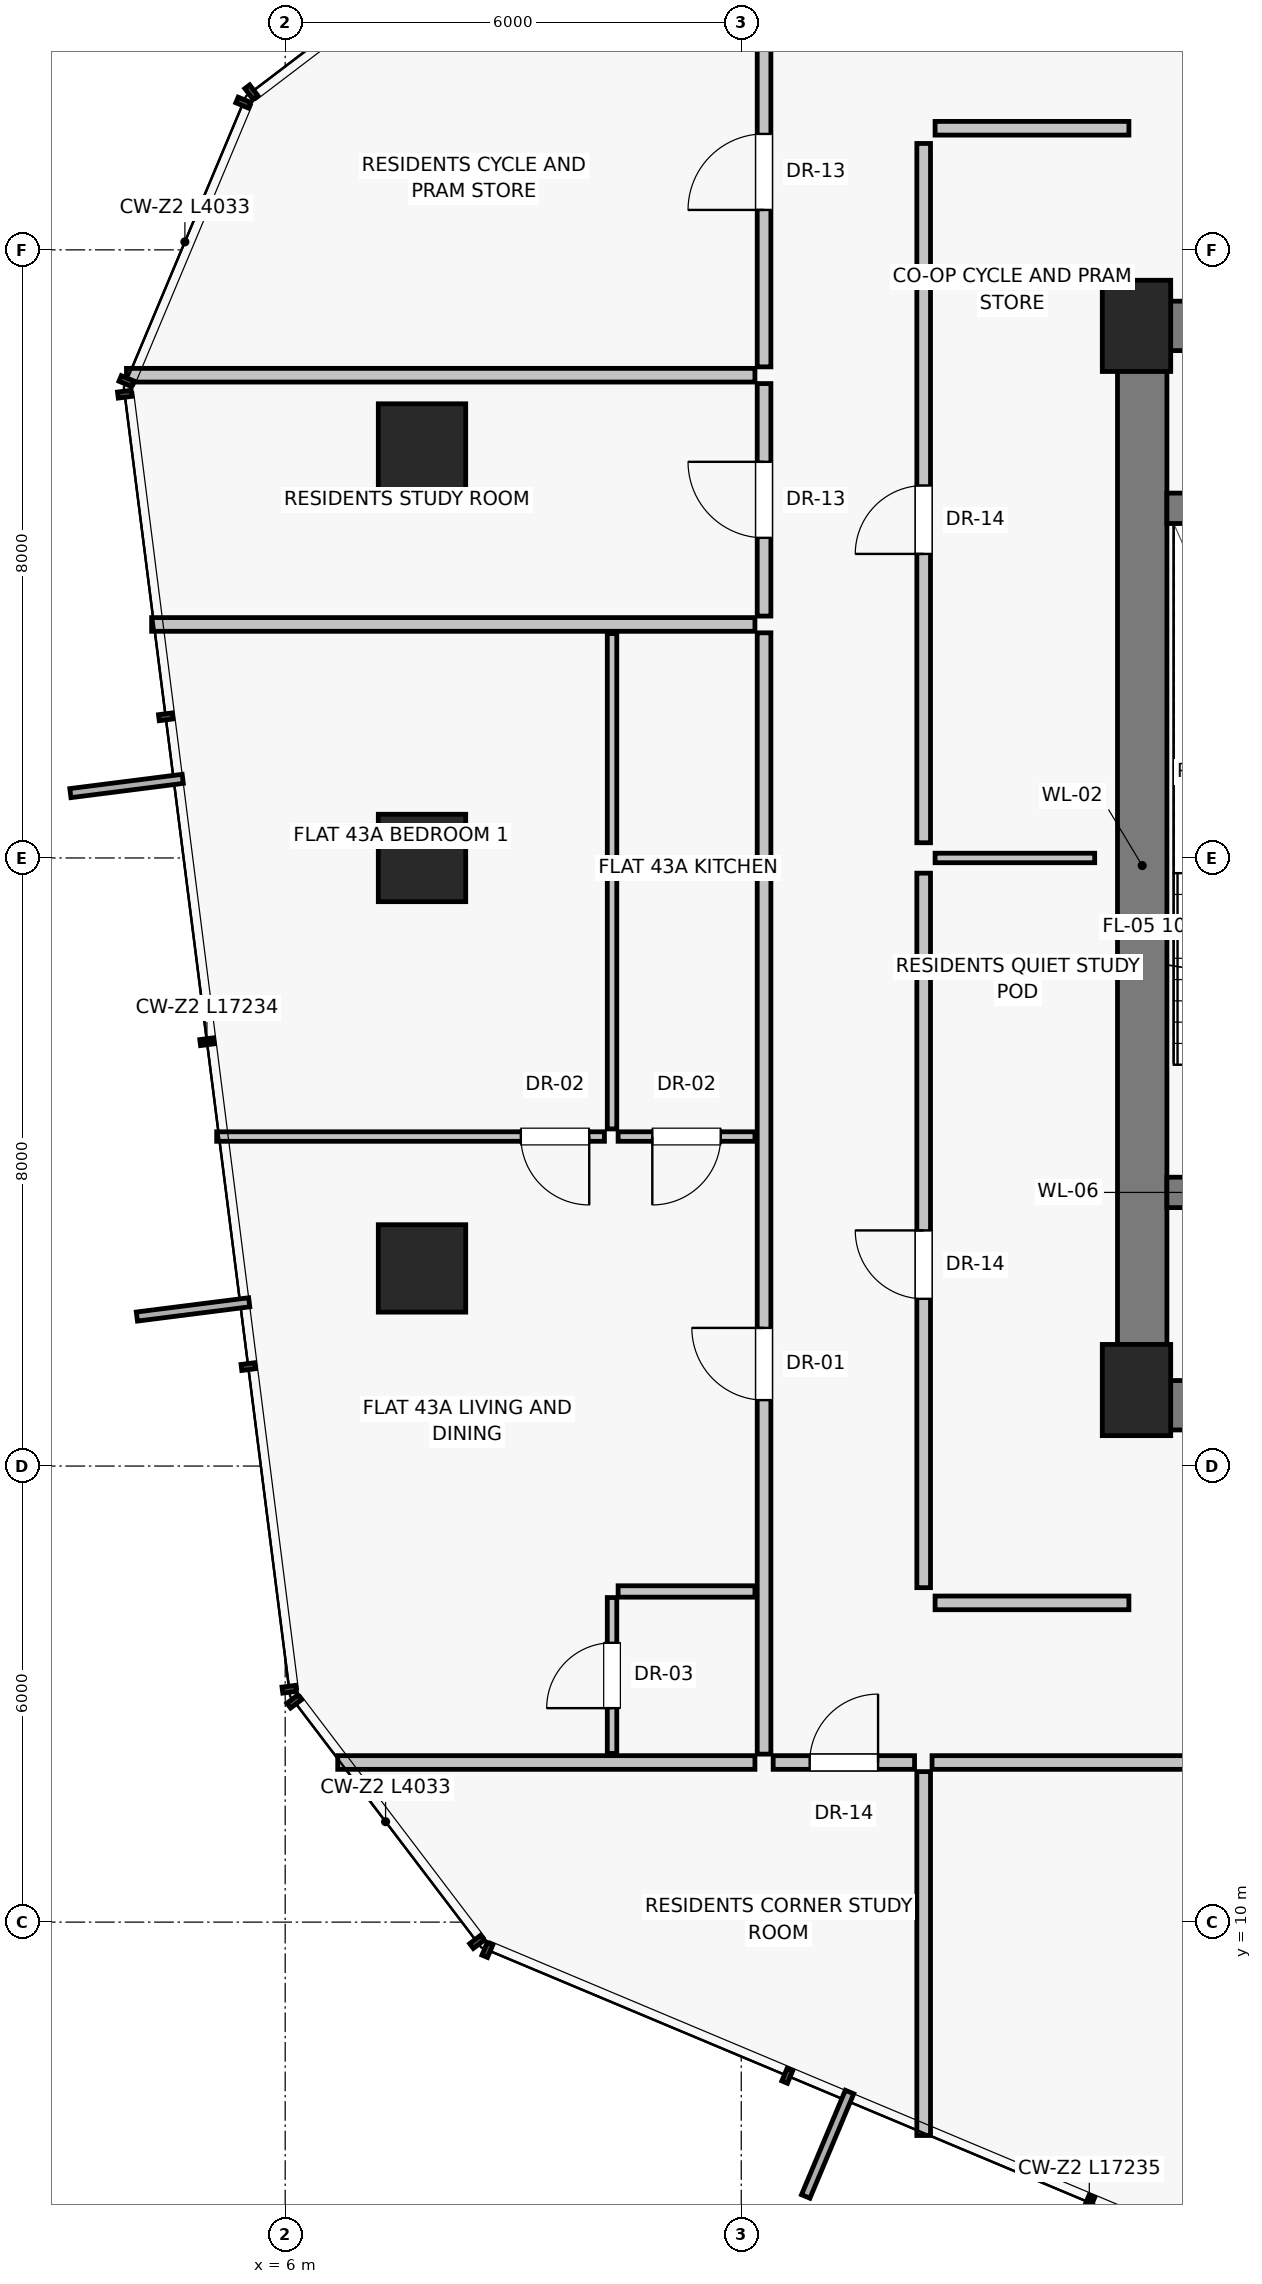
"""IFC4 building model, lengths in metres.
Left out: names, types, materials, properties, quantities, classifications, styles, units other than length and angle.
Written with IfcOpenShell. Run it as: python <this file> out.ifc"""

import sys

from ifc_helpers import new_model, si_unit, direction, frame, frame_2d, origin, origin_2d, place, context, subcontext, project, spatial, rectangle, extrude, source, transform, mapped, element, fill, save


model = new_model("IFC4")
c1 = context("Model", 3, precision=1e-05, world=origin(), true_north=direction((0.0, 1.0)))
c2 = subcontext(c1, "Body", "Model", "MODEL_VIEW")
j1 = project(units=[si_unit("LENGTHUNIT", "METRE"), si_unit("PLANEANGLEUNIT", "RADIAN")], contexts=[c1])
p1 = place(None, origin())
s1 = spatial("IfcSite", under=j1, at=p1, CompositionType="ELEMENT")
p2 = place(p1, origin())
s2 = spatial("IfcBuilding", under=s1, at=p2, CompositionType="ELEMENT")
p3 = place(p2, frame((0.0, 0.0, 152.25)))
s3 = spatial("IfcBuildingStorey", under=s2, at=p3, CompositionType="ELEMENT", Elevation=152.25)
for number, where, z_axis, x_axis in (
    (1, (17.2, 17.0, 0.0), (0.0, 0.0, 1.0), (1.0, 0.0, 0.0)),
    (2, (17.2, 31.0, 0.0), (0.0, 0.0, 1.0), (1.0, 0.0, 0.0)),
):
    element("IfcColumn", number, at=place(p3, frame(where, z_axis=z_axis, x_axis=x_axis)), inside=s3, PredefinedType="PILASTER", context=c2, shape_type="SweptSolid", body=[
        extrude(rectangle(XDim=0.9, YDim=1.2, at=origin_2d()), origin(), (0.0, 0.0, 1.0), 3.25),
    ])
for number, where, z_axis, x_axis in (
    (3, (7.8, 29.4, 0.0), (0.0, 0.0, 1.0), (1.0, 0.0, 0.0)),
    (4, (7.8, 24.0, 0.0), (0.0, 0.0, 1.0), (1.0, 0.0, 0.0)),
    (5, (7.8, 18.6, 0.0), (0.0, 0.0, 1.0), (1.0, 0.0, 0.0)),
):
    element("IfcColumn", number, at=place(p3, frame(where, z_axis=z_axis, x_axis=x_axis)), inside=s3, PredefinedType="COLUMN", context=c2, shape_type="SweptSolid", body=[
        extrude(rectangle(XDim=1.15, YDim=1.15, at=origin_2d()), origin(), (0.0, 0.0, 1.0), 3.25),
    ])
p4 = place(p3, frame((17.275, 16.8, 0.0), z_axis=(0.0, 0.0, 1.0), x_axis=(0.0, 1.0, 0.0)))
e6 = element("IfcWall", 6, at=p4, inside=s3, PredefinedType="SHEAR", context=c2, shape_type="SweptSolid", body=[
    extrude(rectangle(XDim=14.2, YDim=0.65, at=frame_2d((7.1, 0.0))), origin(), (0.0, 0.0, 1.0), 3.0),
])
p5 = place(p3, frame((17.2, 16.8, 0.0), z_axis=(0.0, 0.0, 1.0), x_axis=(1.0, 0.0, 0.0)))
e7 = element("IfcWall", 7, at=p5, inside=s3, PredefinedType="SHEAR", context=c2, shape_type="SweptSolid", body=[
    extrude(rectangle(XDim=5.85, YDim=0.65, at=frame_2d((2.925, 0.0))), origin(), (0.0, 0.0, 1.0), 3.0),
])
p6 = place(p5, frame((1.15, 0.0, 0.0)))
e8 = element("IfcOpeningElement", 8, at=p6, cuts=e7, PredefinedType="OPENING", context=c2, shape_type="SweptSolid", body=[
    extrude(rectangle(XDim=1.2, YDim=2.03, at=frame_2d((0.6, 1.015))), frame((0.0, 0.335, 0.0), z_axis=(0.0, -1.0, 0.0), x_axis=(1.0, 0.0, 0.0)), (0.0, 0.0, 1.0), 0.67),
])
p7 = place(p3, frame((17.2, 31.0, 0.0), z_axis=(0.0, 0.0, 1.0), x_axis=(1.0, 0.0, 0.0)))
e9 = element("IfcWall", 9, at=p7, inside=s3, PredefinedType="SHEAR", context=c2, shape_type="SweptSolid", body=[
    extrude(rectangle(XDim=3.8, YDim=0.65, at=frame_2d((1.9, 0.0))), origin(), (0.0, 0.0, 1.0), 3.0),
])
p8 = place(p7, frame((1.25, 0.0, 0.0)))
e10 = element("IfcOpeningElement", 10, at=p8, cuts=e9, PredefinedType="OPENING", context=c2, shape_type="SweptSolid", body=[
    extrude(rectangle(XDim=0.86, YDim=2.01, at=frame_2d((0.43, 1.005))), frame((0.0, 0.335, 0.0), z_axis=(0.0, -1.0, 0.0), x_axis=(1.0, 0.0, 0.0)), (0.0, 0.0, 1.0), 0.67),
])
p9 = place(p3, frame((17.6, 19.6, 0.0), z_axis=(0.0, 0.0, 1.0), x_axis=(1.0, 0.0, 0.0)))
e11 = element("IfcWall", 11, at=p9, inside=s3, PredefinedType="SHEAR", context=c2, shape_type="SweptSolid", body=[
    extrude(rectangle(XDim=3.4, YDim=0.4, at=frame_2d((1.7, 0.0))), origin(), (0.0, 0.0, 1.0), 3.0),
])
p10 = place(p9, frame((1.05, 0.0, 0.0)))
e12 = element("IfcOpeningElement", 12, at=p10, cuts=e11, PredefinedType="OPENING", context=c2, shape_type="SweptSolid", body=[
    extrude(rectangle(XDim=1.1, YDim=2.03, at=frame_2d((0.55, 1.015))), frame((0.0, 0.21, 0.0), z_axis=(0.0, -1.0, 0.0), x_axis=(1.0, 0.0, 0.0)), (0.0, 0.0, 1.0), 0.42),
])
p11 = place(p3, frame((17.6, 28.6, 0.0), z_axis=(0.0, 0.0, 1.0), x_axis=(1.0, 0.0, 0.0)))
e13 = element("IfcWall", 13, at=p11, inside=s3, PredefinedType="SHEAR", context=c2, shape_type="SweptSolid", body=[
    extrude(rectangle(XDim=3.4, YDim=0.4, at=frame_2d((1.7, 0.0))), origin(), (0.0, 0.0, 1.0), 3.0),
])
p12 = place(p3, frame((14.4, 14.4, 0.0), z_axis=(0.0, 0.0, 1.0), x_axis=(0.0, 1.0, 0.0)))
e14 = element("IfcWall", 14, at=p12, inside=s3, PredefinedType="PARTITIONING", context=c2, shape_type="SweptSolid", body=[
    extrude(rectangle(XDim=9.4, YDim=0.18, at=frame_2d((4.7, 0.0))), origin(), (0.0, 0.0, 1.0), 3.0),
])
p13 = place(p12, frame((3.8, 0.0, 0.0)))
e15 = element("IfcOpeningElement", 15, at=p13, cuts=e14, PredefinedType="OPENING", context=c2, shape_type="SweptSolid", body=[
    extrude(rectangle(XDim=0.9, YDim=2.01, at=frame_2d((0.45, 1.005))), frame((0.0, 0.1, 0.0), z_axis=(0.0, -1.0, 0.0), x_axis=(1.0, 0.0, 0.0)), (0.0, 0.0, 1.0), 0.2),
])
p14 = place(p3, frame((14.4, 24.2, 0.0), z_axis=(0.0, 0.0, 1.0), x_axis=(0.0, 1.0, 0.0)))
e16 = element("IfcWall", 16, at=p14, inside=s3, PredefinedType="PARTITIONING", context=c2, shape_type="SweptSolid", body=[
    extrude(rectangle(XDim=9.2, YDim=0.18, at=frame_2d((4.6, 0.0))), origin(), (0.0, 0.0, 1.0), 3.0),
])
p15 = place(p14, frame((3.8, 0.0, 0.0)))
e17 = element("IfcOpeningElement", 17, at=p15, cuts=e16, PredefinedType="OPENING", context=c2, shape_type="SweptSolid", body=[
    extrude(rectangle(XDim=0.9, YDim=2.01, at=frame_2d((0.45, 1.005))), frame((0.0, 0.1, 0.0), z_axis=(0.0, -1.0, 0.0), x_axis=(1.0, 0.0, 0.0)), (0.0, 0.0, 1.0), 0.2),
])
p16 = place(p3, frame((14.55, 24.0, 0.0), z_axis=(0.0, 0.0, 1.0), x_axis=(1.0, 0.0, 0.0)))
e18 = element("IfcWall", 18, at=p16, inside=s3, PredefinedType="PARTITIONING", context=c2, shape_type="SweptSolid", body=[
    extrude(rectangle(XDim=2.1, YDim=0.125, at=frame_2d((1.05, 0.0))), origin(), (0.0, 0.0, 1.0), 3.0),
])
for number, where, z_axis, x_axis in (
    (19, (14.55, 14.2, 0.0), (0.0, 0.0, 1.0), (1.0, 0.0, 0.0)),
    (20, (14.55, 33.6, 0.0), (0.0, 0.0, 1.0), (1.0, 0.0, 0.0)),
):
    element("IfcWall", number, at=place(p3, frame(where, z_axis=z_axis, x_axis=x_axis)), inside=s3, PredefinedType="PARTITIONING", context=c2, shape_type="SweptSolid", body=[
        extrude(rectangle(XDim=2.55, YDim=0.18, at=frame_2d((1.275, 0.0))), origin(), (0.0, 0.0, 1.0), 3.0),
    ])
p17 = place(p3, frame((14.4, 11.98, 0.0), z_axis=(0.0, 0.0, 1.0), x_axis=(0.0, -1.0, 0.0)))
e21 = element("IfcWall", 21, at=p17, inside=s3, PredefinedType="PARTITIONING", context=c2, shape_type="SweptSolid", body=[
    extrude(rectangle(XDim=4.787, YDim=0.18, at=frame_2d((2.394, 0.0))), origin(), (0.0, 0.0, 1.0), 3.0),
])
p18 = place(p3, frame((14.51, 12.1, 0.0), z_axis=(0.0, 0.0, 1.0), x_axis=(1.0, 0.0, 0.0)))
e22 = element("IfcWall", 22, at=p18, inside=s3, PredefinedType="PARTITIONING", context=c2, shape_type="SweptSolid", body=[
    extrude(rectangle(XDim=11.574, YDim=0.18, at=frame_2d((5.787, 0.0))), origin(), (0.0, 0.0, 1.0), 2.58),
])
p19 = place(p18, frame((4.887, 0.0, 0.0)))
e23 = element("IfcOpeningElement", 23, at=p19, cuts=e22, PredefinedType="OPENING", context=c2, shape_type="SweptSolid", body=[
    extrude(rectangle(XDim=1.8, YDim=2.25, at=frame_2d((0.9, 1.125))), frame((0.0, 0.1, 0.0), z_axis=(0.0, -1.0, 0.0), x_axis=(1.0, 0.0, 0.0)), (0.0, 0.0, 1.0), 0.2),
])
p20 = place(p3, frame((12.18, 12.1, 0.0), z_axis=(0.0, 0.0, 1.0), x_axis=(-1.0, 0.0, 0.0)))
e24 = element("IfcWall", 24, at=p20, inside=s3, PredefinedType="PARTITIONING", context=c2, shape_type="SweptSolid", body=[
    extrude(rectangle(XDim=5.489, YDim=0.18, at=frame_2d((2.744, 0.0))), origin(), (0.0, 0.0, 1.0), 3.0),
])
p21 = place(p3, frame((12.3, 12.21, 0.0), z_axis=(0.0, 0.0, 1.0), x_axis=(0.0, 1.0, 0.0)))
e25 = element("IfcWall", 25, at=p21, inside=s3, PredefinedType="PARTITIONING", context=c2, shape_type="SweptSolid", body=[
    extrude(rectangle(XDim=14.752, YDim=0.18, at=frame_2d((7.376, 0.0))), origin(), (0.0, 0.0, 1.0), 2.58),
])
p22 = place(p21, frame((4.657, 0.0, 0.0)))
e26 = element("IfcOpeningElement", 26, at=p22, cuts=e25, PredefinedType="OPENING", context=c2, shape_type="SweptSolid", body=[
    extrude(rectangle(XDim=0.95, YDim=2.02, at=frame_2d((0.475, 1.01))), frame((0.0, 0.1, 0.0), z_axis=(0.0, -1.0, 0.0), x_axis=(1.0, 0.0, 0.0)), (0.0, 0.0, 1.0), 0.2),
])
p23 = place(p3, frame((12.18, 14.35, 0.0), z_axis=(0.0, 0.0, 1.0), x_axis=(-1.0, 0.0, 0.0)))
e27 = element("IfcWall", 27, at=p23, inside=s3, PredefinedType="PARTITIONING", context=c2, shape_type="SweptSolid", body=[
    extrude(rectangle(XDim=1.8, YDim=0.15, at=frame_2d((0.9, 0.0))), origin(), (0.0, 0.0, 1.0), 3.0),
])
p24 = place(p3, frame((10.3, 12.22, 0.0), z_axis=(0.0, 0.0, 1.0), x_axis=(0.0, 1.0, 0.0)))
e28 = element("IfcWall", 28, at=p24, inside=s3, PredefinedType="PARTITIONING", context=c2, shape_type="SweptSolid", body=[
    extrude(rectangle(XDim=2.05, YDim=0.125, at=frame_2d((1.025, 0.0))), origin(), (0.0, 0.0, 1.0), 3.0),
])
p25 = place(p24, frame((0.595, 0.0, 0.0)))
e29 = element("IfcOpeningElement", 29, at=p25, cuts=e28, PredefinedType="OPENING", context=c2, shape_type="SweptSolid", body=[
    extrude(rectangle(XDim=0.86, YDim=2.01, at=frame_2d((0.43, 1.005))), frame((0.0, 0.073, 0.0), z_axis=(0.0, -1.0, 0.0), x_axis=(1.0, 0.0, 0.0)), (0.0, 0.0, 1.0), 0.145),
])
p26 = place(p3, frame((12.18, 20.335, 0.0), z_axis=(0.0, 0.0, 1.0), x_axis=(-1.0, 0.0, 0.0)))
e30 = element("IfcWall", 30, at=p26, inside=s3, PredefinedType="PARTITIONING", context=c2, shape_type="SweptSolid", body=[
    extrude(rectangle(XDim=1.8, YDim=0.125, at=frame_2d((0.9, 0.0))), origin(), (0.0, 0.0, 1.0), 3.0),
])
p27 = place(p26, frame((0.45, 0.0, 0.0)))
e31 = element("IfcOpeningElement", 31, at=p27, cuts=e30, PredefinedType="OPENING", context=c2, shape_type="SweptSolid", body=[
    extrude(rectangle(XDim=0.9, YDim=2.01, at=frame_2d((0.45, 1.005))), frame((0.0, 0.073, 0.0), z_axis=(0.0, -1.0, 0.0), x_axis=(1.0, 0.0, 0.0)), (0.0, 0.0, 1.0), 0.145),
])
p28 = place(p3, frame((10.3, 20.435, 0.0), z_axis=(0.0, 0.0, 1.0), x_axis=(0.0, 1.0, 0.0)))
e32 = element("IfcWall", 32, at=p28, inside=s3, PredefinedType="PARTITIONING", context=c2, shape_type="SweptSolid", body=[
    extrude(rectangle(XDim=6.517, YDim=0.125, at=frame_2d((3.258, 0.0))), origin(), (0.0, 0.0, 1.0), 3.0),
])
p29 = place(p3, frame((10.2, 20.335, 0.0), z_axis=(0.0, 0.0, 1.0), x_axis=(-1.0, 0.0, 0.0)))
e33 = element("IfcWall", 33, at=p29, inside=s3, PredefinedType="PARTITIONING", context=c2, shape_type="SweptSolid", body=[
    extrude(rectangle(XDim=5.101, YDim=0.125, at=frame_2d((2.551, 0.0))), origin(), (0.0, 0.0, 1.0), 3.0),
])
p30 = place(p29, frame((0.2, 0.0, 0.0)))
e34 = element("IfcOpeningElement", 34, at=p30, cuts=e33, PredefinedType="OPENING", context=c2, shape_type="SweptSolid", body=[
    extrude(rectangle(XDim=0.9, YDim=2.01, at=frame_2d((0.45, 1.005))), frame((0.0, 0.073, 0.0), z_axis=(0.0, -1.0, 0.0), x_axis=(1.0, 0.0, 0.0)), (0.0, 0.0, 1.0), 0.145),
])
p31 = place(p3, frame((12.18, 27.072, 0.0), z_axis=(0.0, 0.0, 1.0), x_axis=(-1.0, 0.0, 0.0)))
e35 = element("IfcWall", 35, at=p31, inside=s3, PredefinedType="PARTITIONING", context=c2, shape_type="SweptSolid", body=[
    extrude(rectangle(XDim=7.937, YDim=0.18, at=frame_2d((3.969, 0.0))), origin(), (0.0, 0.0, 1.0), 3.0),
])
p32 = place(p3, frame((12.3, 27.182, 0.0), z_axis=(0.0, 0.0, 1.0), x_axis=(0.0, 1.0, 0.0)))
e36 = element("IfcWall", 36, at=p32, inside=s3, PredefinedType="PARTITIONING", context=c2, shape_type="SweptSolid", body=[
    extrude(rectangle(XDim=3.059, YDim=0.18, at=frame_2d((1.53, 0.0))), origin(), (0.0, 0.0, 1.0), 2.58),
])
p33 = place(p32, frame((1.03, 0.0, 0.0)))
e37 = element("IfcOpeningElement", 37, at=p33, cuts=e36, PredefinedType="OPENING", context=c2, shape_type="SweptSolid", body=[
    extrude(rectangle(XDim=1.0, YDim=2.01, at=frame_2d((0.5, 1.005))), frame((0.0, 0.1, 0.0), z_axis=(0.0, -1.0, 0.0), x_axis=(1.0, 0.0, 0.0)), (0.0, 0.0, 1.0), 0.2),
])
p34 = place(p3, frame((12.3, 30.461, 0.0), z_axis=(0.0, 0.0, 1.0), x_axis=(0.0, 1.0, 0.0)))
e38 = element("IfcWall", 38, at=p34, inside=s3, PredefinedType="PARTITIONING", context=c2, shape_type="SweptSolid", body=[
    extrude(rectangle(XDim=5.129, YDim=0.18, at=frame_2d((2.564, 0.0))), origin(), (0.0, 0.0, 1.0), 3.0),
])
p35 = place(p34, frame((2.064, 0.0, 0.0)))
e39 = element("IfcOpeningElement", 39, at=p35, cuts=e38, PredefinedType="OPENING", context=c2, shape_type="SweptSolid", body=[
    extrude(rectangle(XDim=1.0, YDim=2.01, at=frame_2d((0.5, 1.005))), frame((0.0, 0.1, 0.0), z_axis=(0.0, -1.0, 0.0), x_axis=(1.0, 0.0, 0.0)), (0.0, 0.0, 1.0), 0.2),
])
p36 = place(p3, frame((12.18, 30.351, 0.0), z_axis=(0.0, 0.0, 1.0), x_axis=(-1.0, 0.0, 0.0)))
e40 = element("IfcWall", 40, at=p36, inside=s3, PredefinedType="PARTITIONING", context=c2, shape_type="SweptSolid", body=[
    extrude(rectangle(XDim=8.268, YDim=0.18, at=frame_2d((4.134, 0.0))), origin(), (0.0, 0.0, 1.0), 2.378),
])
p37 = place(p3, frame((12.42, 12.1, 0.0), z_axis=(0.0, 0.0, 1.0), x_axis=(1.0, 0.0, 0.0)))
e41 = element("IfcWall", 41, at=p37, inside=s3, PredefinedType="PARTITIONING", context=c2, shape_type="SweptSolid", body=[
    extrude(rectangle(XDim=1.86, YDim=0.18, at=frame_2d((0.93, 0.0))), origin(), (0.0, 0.0, 1.0), 3.0),
])
p38 = place(p37, frame((0.48, 0.0, 0.0)))
e42 = element("IfcOpeningElement", 42, at=p38, cuts=e41, PredefinedType="OPENING", context=c2, shape_type="SweptSolid", body=[
    extrude(rectangle(XDim=0.9, YDim=2.01, at=frame_2d((0.45, 1.005))), frame((0.0, 0.1, 0.0), z_axis=(0.0, -1.0, 0.0), x_axis=(1.0, 0.0, 0.0)), (0.0, 0.0, 1.0), 0.2),
])
m1 = source(origin(), c2, "Body", "SweptSolid", [
    extrude(rectangle(XDim=0.9, YDim=2.01, at=frame_2d((0.45, 1.005))), frame((0.0, 0.025, 0.0), z_axis=(0.0, -1.0, 0.0), x_axis=(1.0, 0.0, 0.0)), (0.0, 0.0, 1.0), 0.05),
])
p39 = place(p13, origin())
e43 = element("IfcDoor", 43, at=p39, inside=s3, OperationType="SINGLE_SWING_RIGHT", PredefinedType="DOOR", context=c2, shape_type="MappedRepresentation", body=[
    mapped(m1, transform((0.0, 0.0, 0.0), scale=1.0)),
])
fill(e15, e43)
p40 = place(p15, origin())
e44 = element("IfcDoor", 44, at=p40, inside=s3, OperationType="SINGLE_SWING_LEFT", PredefinedType="DOOR", context=c2, shape_type="MappedRepresentation", body=[
    mapped(m1, transform((0.0, 0.0, 0.0), scale=1.0)),
])
fill(e17, e44)
m2 = source(origin(), c2, "Body", "SweptSolid", [
    extrude(rectangle(XDim=0.95, YDim=2.02, at=frame_2d((0.475, 1.01))), frame((0.0, 0.025, 0.0), z_axis=(0.0, -1.0, 0.0), x_axis=(1.0, 0.0, 0.0)), (0.0, 0.0, 1.0), 0.05),
])
p41 = place(p22, origin())
e45 = element("IfcDoor", 45, at=p41, inside=s3, OperationType="SINGLE_SWING_RIGHT", PredefinedType="DOOR", context=c2, shape_type="MappedRepresentation", body=[
    mapped(m2, transform((0.0, 0.0, 0.0), scale=1.0)),
])
fill(e26, e45)
m3 = source(origin(), c2, "Body", "SweptSolid", [
    extrude(rectangle(XDim=0.86, YDim=2.01, at=frame_2d((0.43, 1.005))), frame((0.0, 0.025, 0.0), z_axis=(0.0, -1.0, 0.0), x_axis=(1.0, 0.0, 0.0)), (0.0, 0.0, 1.0), 0.05),
])
p42 = place(p25, origin())
e46 = element("IfcDoor", 46, at=p42, inside=s3, OperationType="SINGLE_SWING_LEFT", PredefinedType="DOOR", context=c2, shape_type="MappedRepresentation", body=[
    mapped(m3, transform((0.0, 0.0, 0.0), scale=1.0)),
])
fill(e29, e46)
p43 = place(p27, origin())
e47 = element("IfcDoor", 47, at=p43, inside=s3, OperationType="SINGLE_SWING_RIGHT", PredefinedType="DOOR", context=c2, shape_type="MappedRepresentation", body=[
    mapped(m1, transform((0.0, 0.0, 0.0), scale=1.0)),
])
fill(e31, e47)
p44 = place(p30, origin())
e48 = element("IfcDoor", 48, at=p44, inside=s3, OperationType="SINGLE_SWING_LEFT", PredefinedType="DOOR", context=c2, shape_type="MappedRepresentation", body=[
    mapped(m1, transform((0.0, 0.0, 0.0), scale=1.0)),
])
fill(e34, e48)
m4 = source(origin(), c2, "Body", "SweptSolid", [
    extrude(rectangle(XDim=1.0, YDim=2.01, at=frame_2d((0.5, 1.005))), frame((0.0, 0.025, 0.0), z_axis=(0.0, -1.0, 0.0), x_axis=(1.0, 0.0, 0.0)), (0.0, 0.0, 1.0), 0.05),
])
p45 = place(p33, origin())
e49 = element("IfcDoor", 49, at=p45, inside=s3, OperationType="SINGLE_SWING_RIGHT", PredefinedType="DOOR", context=c2, shape_type="MappedRepresentation", body=[
    mapped(m4, transform((0.0, 0.0, 0.0), scale=1.0)),
])
fill(e37, e49)
p46 = place(p35, origin())
e50 = element("IfcDoor", 50, at=p46, inside=s3, OperationType="SINGLE_SWING_LEFT", PredefinedType="DOOR", context=c2, shape_type="MappedRepresentation", body=[
    mapped(m4, transform((0.0, 0.0, 0.0), scale=1.0)),
])
fill(e39, e50)
p47 = place(p38, origin())
e51 = element("IfcDoor", 51, at=p47, inside=s3, OperationType="SINGLE_SWING_RIGHT", PredefinedType="DOOR", context=c2, shape_type="MappedRepresentation", body=[
    mapped(m1, transform((0.0, 0.0, 0.0), scale=1.0)),
])
fill(e42, e51)
save(model, sys.argv[1])
